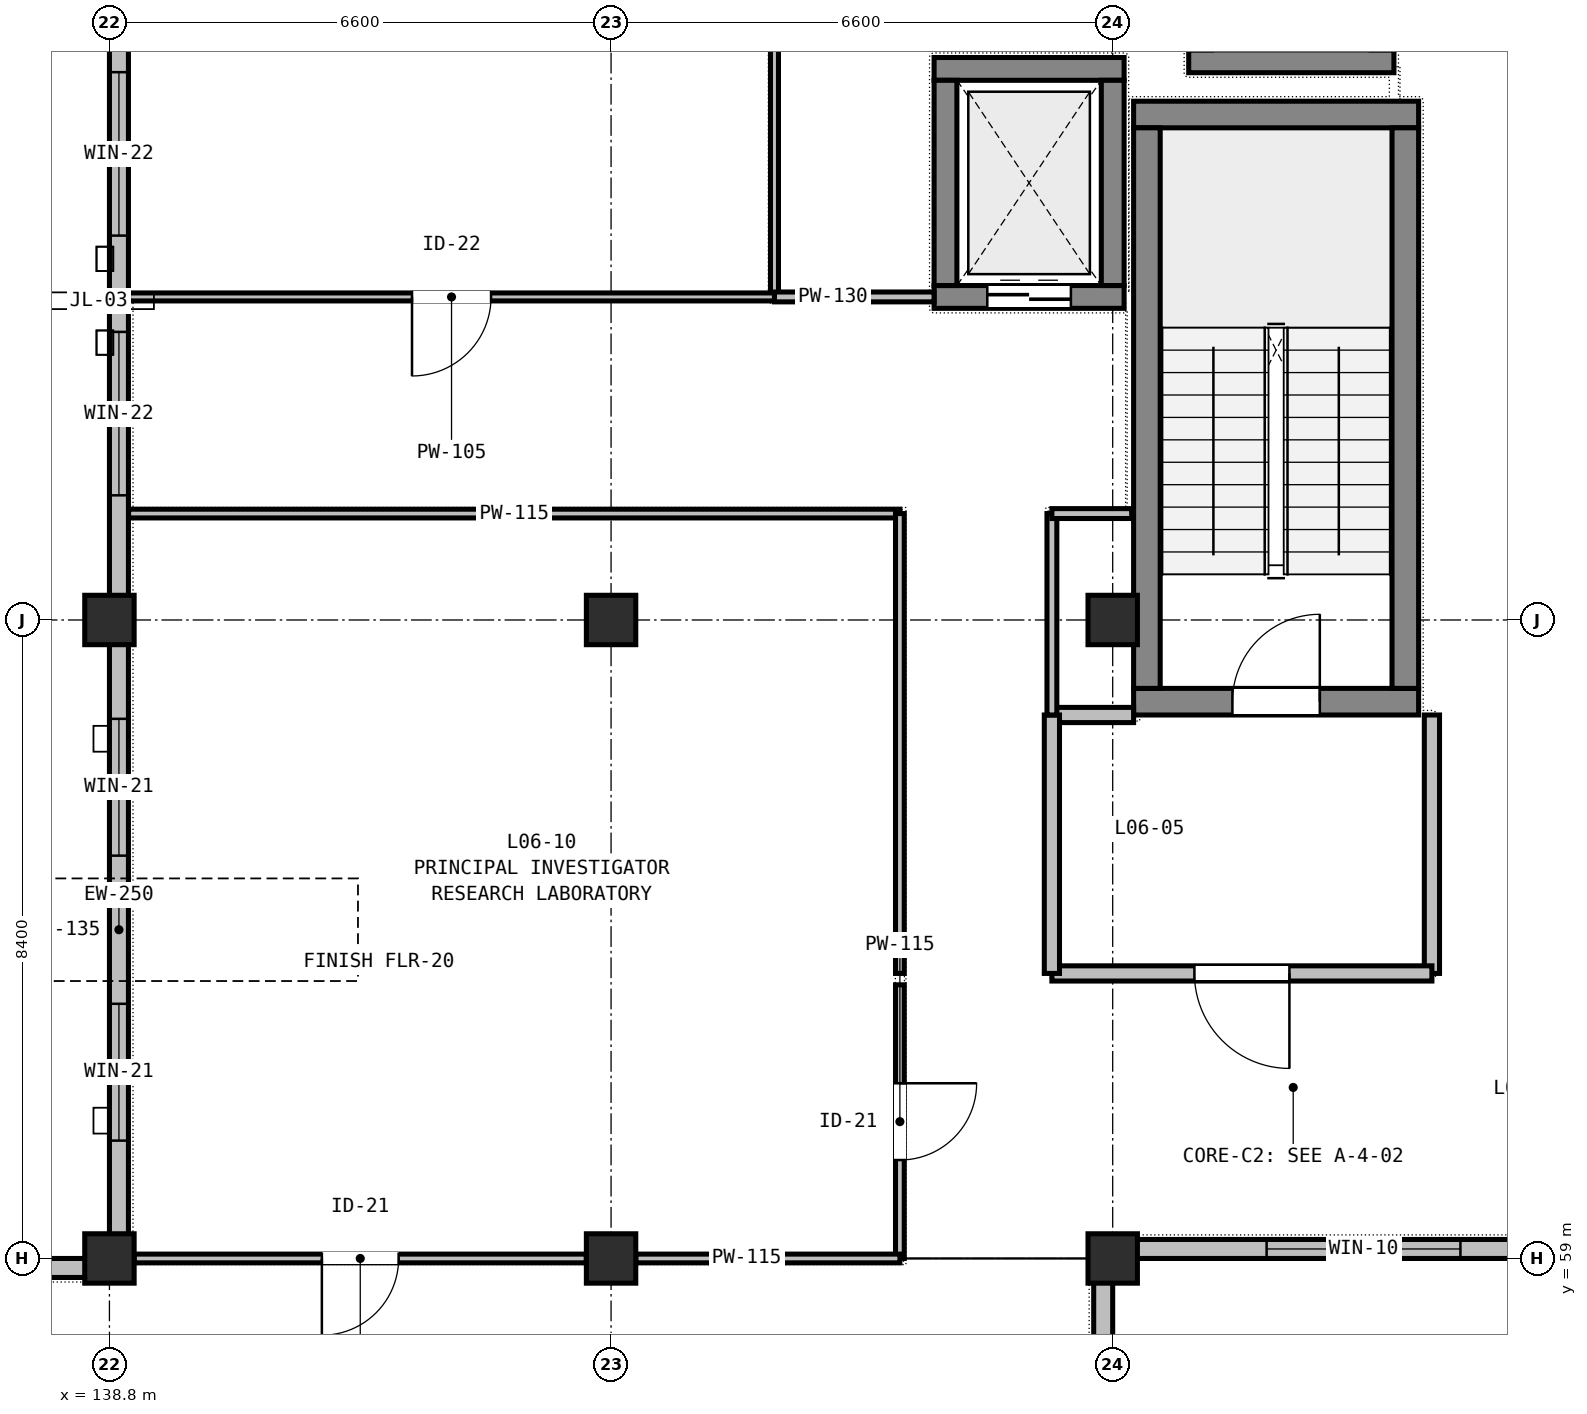
"""IFC4 building model, lengths in metres.
Left out: names, types, materials, properties, quantities, classifications, styles, units other than length and angle.
Written with IfcOpenShell. Run it as: python <this file> out.ifc"""

import sys

from ifc_helpers import new_model, si_unit, direction, frame, frame_2d, origin, origin_2d, place, context, subcontext, project, spatial, rectangle, extrude, element, fill, save


model = new_model("IFC4")
c1 = context("Model", 3, precision=1e-05, world=origin(), true_north=direction((0.0, 1.0)))
c2 = subcontext(c1, "Body", "Model", "MODEL_VIEW")
j1 = project(units=[si_unit("LENGTHUNIT", "METRE"), si_unit("PLANEANGLEUNIT", "RADIAN")], contexts=[c1])
p1 = place(None, origin())
s1 = spatial("IfcSite", under=j1, at=p1, CompositionType="ELEMENT")
p2 = place(p1, origin())
s2 = spatial("IfcBuilding", under=s1, at=p2, CompositionType="ELEMENT")
p3 = place(p2, frame((0.0, 0.0, 28.5)))
s3 = spatial("IfcBuildingStorey", under=s2, at=p3, CompositionType="ELEMENT", Elevation=28.5)
for number, where, z_axis, x_axis in (
    (1, (138.8, 59.0, 0.0), (0.0, 0.0, 1.0), (1.0, 0.0, 0.0)),
    (2, (138.8, 67.4, 0.0), (0.0, 0.0, 1.0), (1.0, 0.0, 0.0)),
):
    element("IfcColumn", number, at=place(p3, frame(where, z_axis=z_axis, x_axis=x_axis)), inside=s3, PredefinedType="COLUMN", context=c2, shape_type="SweptSolid", body=[
        extrude(rectangle(XDim=0.65, YDim=0.65, at=origin_2d()), origin(), (0.0, 0.0, 1.0), 4.14),
    ])
for number, where, z_axis, x_axis in (
    (3, (145.4, 59.0, 0.0), (0.0, 0.0, 1.0), (1.0, 0.0, 0.0)),
    (4, (145.4, 67.4, 0.0), (0.0, 0.0, 1.0), (1.0, 0.0, 0.0)),
    (5, (152.0, 59.0, 0.0), (0.0, 0.0, 1.0), (1.0, 0.0, 0.0)),
    (6, (152.0, 67.4, 0.0), (0.0, 0.0, 1.0), (1.0, 0.0, 0.0)),
):
    element("IfcColumn", number, at=place(p3, frame(where, z_axis=z_axis, x_axis=x_axis)), inside=s3, PredefinedType="COLUMN", context=c2, shape_type="SweptSolid", body=[
        extrude(rectangle(XDim=0.65, YDim=0.65, at=origin_2d()), origin(), (0.0, 0.0, 1.0), 4.2),
    ])
p4 = place(p3, frame((152.275, 66.325, 0.0), z_axis=(0.0, 0.0, 1.0), x_axis=(1.0, 0.0, 0.0)))
e7 = element("IfcWall", 7, at=p4, inside=s3, PredefinedType="SHEAR", context=c2, shape_type="SweptSolid", body=[
    extrude(rectangle(XDim=3.75, YDim=0.35, at=frame_2d((1.875, 0.0))), origin(), (0.0, 0.0, 1.0), 4.2),
])
p5 = place(p4, frame((1.3, 0.0, 0.0)))
e8 = element("IfcOpeningElement", 8, at=p5, cuts=e7, PredefinedType="OPENING", context=c2, shape_type="SweptSolid", body=[
    extrude(rectangle(XDim=1.15, YDim=2.15, at=frame_2d((0.575, 1.075))), frame((0.0, 0.185, 0.0), z_axis=(0.0, -1.0, 0.0), x_axis=(1.0, 0.0, 0.0)), (0.0, 0.0, 1.0), 0.37),
])
p6 = place(p3, frame((152.275, 74.05, 0.0), z_axis=(0.0, 0.0, 1.0), x_axis=(1.0, 0.0, 0.0)))
e9 = element("IfcWall", 9, at=p6, inside=s3, PredefinedType="SHEAR", context=c2, shape_type="SweptSolid", body=[
    extrude(rectangle(XDim=3.75, YDim=0.35, at=frame_2d((1.875, 0.0))), origin(), (0.0, 0.0, 1.0), 4.2),
])
for number, where, z_axis, x_axis in (
    (10, (152.45, 66.5, 0.0), (0.0, 0.0, 1.0), (0.0, 1.0, 0.0)),
    (11, (155.85, 66.5, 0.0), (0.0, 0.0, 1.0), (0.0, 1.0, 0.0)),
):
    element("IfcWall", number, at=place(p3, frame(where, z_axis=z_axis, x_axis=x_axis)), inside=s3, PredefinedType="SHEAR", context=c2, shape_type="SweptSolid", body=[
        extrude(rectangle(XDim=7.375, YDim=0.35, at=frame_2d((3.688, 0.0))), origin(), (0.0, 0.0, 1.0), 4.2),
    ])
p7 = place(p3, frame((149.65, 71.65, 0.0), z_axis=(0.0, 0.0, 1.0), x_axis=(1.0, 0.0, 0.0)))
e12 = element("IfcWall", 12, at=p7, inside=s3, PredefinedType="SHEAR", context=c2, shape_type="SweptSolid", body=[
    extrude(rectangle(XDim=2.5, YDim=0.3, at=frame_2d((1.25, 0.0))), origin(), (0.0, 0.0, 1.0), 4.2),
])
p8 = place(p7, frame((0.7, 0.0, 0.0)))
e13 = element("IfcOpeningElement", 13, at=p8, cuts=e12, PredefinedType="OPENING", context=c2, shape_type="SweptSolid", body=[
    extrude(rectangle(XDim=1.1, YDim=2.1, at=frame_2d((0.55, 1.05))), frame((0.0, 0.16, 0.0), z_axis=(0.0, -1.0, 0.0), x_axis=(1.0, 0.0, 0.0)), (0.0, 0.0, 1.0), 0.32),
])
p9 = place(p3, frame((149.65, 74.65, 0.0), z_axis=(0.0, 0.0, 1.0), x_axis=(1.0, 0.0, 0.0)))
e14 = element("IfcWall", 14, at=p9, inside=s3, PredefinedType="SHEAR", context=c2, shape_type="SweptSolid", body=[
    extrude(rectangle(XDim=2.5, YDim=0.3, at=frame_2d((1.25, 0.0))), origin(), (0.0, 0.0, 1.0), 4.2),
])
for number, where, z_axis, x_axis in (
    (15, (149.8, 71.8, 0.0), (0.0, 0.0, 1.0), (0.0, 1.0, 0.0)),
    (16, (152.0, 71.8, 0.0), (0.0, 0.0, 1.0), (0.0, 1.0, 0.0)),
    (17, (153.0, 74.75, 0.0), (0.0, 0.0, 1.0), (1.0, 0.0, 0.0)),
):
    element("IfcWall", number, at=place(p3, frame(where, z_axis=z_axis, x_axis=x_axis)), inside=s3, PredefinedType="SHEAR", context=c2, shape_type="SweptSolid", body=[
        extrude(rectangle(XDim=2.7, YDim=0.3, at=frame_2d((1.35, 0.0))), origin(), (0.0, 0.0, 1.0), 4.2),
    ])
p10 = place(p3, frame((135.2, 58.875, 0.0), z_axis=(0.0, 0.0, 1.0), x_axis=(1.0, 0.0, 0.0)))
e18 = element("IfcWall", 18, at=p10, inside=s3, PredefinedType="STANDARD", context=c2, shape_type="SweptSolid", body=[
    extrude(rectangle(XDim=3.6, YDim=0.25, at=frame_2d((1.8, 0.0))), origin(), (0.0, 0.0, 1.0), 3.435),
])
p11 = place(p10, frame((1.025, 0.0, 0.75)))
e19 = element("IfcOpeningElement", 19, at=p11, cuts=e18, PredefinedType="OPENING", context=c2, shape_type="SweptSolid", body=[
    extrude(rectangle(XDim=1.55, YDim=2.4, at=frame_2d((0.775, 1.2))), frame((0.0, 0.135, 0.0), z_axis=(0.0, -1.0, 0.0), x_axis=(1.0, 0.0, 0.0)), (0.0, 0.0, 1.0), 0.27),
])
p12 = place(p3, frame((138.925, 59.25, 0.0), z_axis=(0.0, 0.0, 1.0), x_axis=(0.0, 1.0, 0.0)))
e20 = element("IfcWall", 20, at=p12, inside=s3, PredefinedType="STANDARD", context=c2, shape_type="SweptSolid", body=[
    extrude(rectangle(XDim=8.15, YDim=0.25, at=frame_2d((4.075, 0.0))), origin(), (0.0, 0.0, 1.0), 3.585),
])
p13 = place(p12, frame((1.301, 0.0, 0.75)))
e21 = element("IfcOpeningElement", 21, at=p13, cuts=e20, PredefinedType="OPENING", context=c2, shape_type="SweptSolid", body=[
    extrude(rectangle(XDim=1.8, YDim=2.4, at=frame_2d((0.9, 1.2))), frame((0.0, 0.135, 0.0), z_axis=(0.0, -1.0, 0.0), x_axis=(1.0, 0.0, 0.0)), (0.0, 0.0, 1.0), 0.27),
])
p14 = place(p12, frame((5.05, 0.0, 0.75)))
e22 = element("IfcOpeningElement", 22, at=p14, cuts=e20, PredefinedType="OPENING", context=c2, shape_type="SweptSolid", body=[
    extrude(rectangle(XDim=1.8, YDim=2.4, at=frame_2d((0.9, 1.2))), frame((0.0, 0.135, 0.0), z_axis=(0.0, -1.0, 0.0), x_axis=(1.0, 0.0, 0.0)), (0.0, 0.0, 1.0), 0.27),
])
p15 = place(p3, frame((138.925, 67.4, 0.0), z_axis=(0.0, 0.0, 1.0), x_axis=(0.0, 1.0, 0.0)))
e23 = element("IfcWall", 23, at=p15, inside=s3, PredefinedType="STANDARD", context=c2, shape_type="SweptSolid", body=[
    extrude(rectangle(XDim=8.4, YDim=0.25, at=frame_2d((4.2, 0.0))), origin(), (0.0, 0.0, 1.0), 3.585),
])
p16 = place(p15, frame((1.64, 0.0, 0.75)))
e24 = element("IfcOpeningElement", 24, at=p16, cuts=e23, PredefinedType="OPENING", context=c2, shape_type="SweptSolid", body=[
    extrude(rectangle(XDim=2.15, YDim=2.4, at=frame_2d((1.075, 1.2))), frame((0.0, 0.135, 0.0), z_axis=(0.0, -1.0, 0.0), x_axis=(1.0, 0.0, 0.0)), (0.0, 0.0, 1.0), 0.27),
])
p17 = place(p15, frame((5.057, 0.0, 0.75)))
e25 = element("IfcOpeningElement", 25, at=p17, cuts=e23, PredefinedType="OPENING", context=c2, shape_type="SweptSolid", body=[
    extrude(rectangle(XDim=2.15, YDim=2.4, at=frame_2d((1.075, 1.2))), frame((0.0, 0.135, 0.0), z_axis=(0.0, -1.0, 0.0), x_axis=(1.0, 0.0, 0.0)), (0.0, 0.0, 1.0), 0.27),
])
p18 = place(p3, frame((158.6, 59.125, 0.0), z_axis=(0.0, 0.0, 1.0), x_axis=(-1.0, 0.0, 0.0)))
e26 = element("IfcWall", 26, at=p18, inside=s3, PredefinedType="STANDARD", context=c2, shape_type="SweptSolid", body=[
    extrude(rectangle(XDim=6.6, YDim=0.25, at=frame_2d((3.3, 0.0))), origin(), (0.0, 0.0, 1.0), 3.435),
])
p19 = place(p18, frame((2.025, 0.0, 0.75)))
e27 = element("IfcOpeningElement", 27, at=p19, cuts=e26, PredefinedType="OPENING", context=c2, shape_type="SweptSolid", body=[
    extrude(rectangle(XDim=2.55, YDim=2.15, at=frame_2d((1.275, 1.075))), frame((0.0, 0.135, 0.0), z_axis=(0.0, -1.0, 0.0), x_axis=(1.0, 0.0, 0.0)), (0.0, 0.0, 1.0), 0.27),
])
p20 = place(p3, frame((151.875, 58.75, 0.0), z_axis=(0.0, 0.0, 1.0), x_axis=(0.0, -1.0, 0.0)))
e28 = element("IfcWall", 28, at=p20, inside=s3, PredefinedType="STANDARD", context=c2, shape_type="SweptSolid", body=[
    extrude(rectangle(XDim=8.15, YDim=0.25, at=frame_2d((4.075, 0.0))), origin(), (0.0, 0.0, 1.0), 3.585),
])
p21 = place(p20, frame((3.19, 0.0, 0.75)))
e29 = element("IfcOpeningElement", 29, at=p21, cuts=e28, PredefinedType="OPENING", context=c2, shape_type="SweptSolid", body=[
    extrude(rectangle(XDim=2.7, YDim=2.2, at=frame_2d((1.35, 1.1))), frame((0.0, 0.135, 0.0), z_axis=(0.0, -1.0, 0.0), x_axis=(1.0, 0.0, 0.0)), (0.0, 0.0, 1.0), 0.27),
])
p22 = place(p3, frame((151.2, 66.15, 0.0), z_axis=(0.0, 0.0, 1.0), x_axis=(1.0, 0.0, 0.0)))
e30 = element("IfcWall", 30, at=p22, inside=s3, PredefinedType="PARTITIONING", context=c2, shape_type="SweptSolid", body=[
    extrude(rectangle(XDim=1.075, YDim=0.2, at=frame_2d((0.538, 0.0))), origin(), (0.0, 0.0, 1.0), 3.435),
])
p23 = place(p3, frame((156.2, 66.15, 0.0), z_axis=(0.0, 0.0, 1.0), x_axis=(0.0, -1.0, 0.0)))
e31 = element("IfcWall", 31, at=p23, inside=s3, PredefinedType="PARTITIONING", context=c2, shape_type="SweptSolid", body=[
    extrude(rectangle(XDim=3.4, YDim=0.2, at=frame_2d((1.7, 0.0))), origin(), (0.0, 0.0, 1.0), 3.915),
])
p24 = place(p3, frame((156.2, 62.75, 0.0), z_axis=(0.0, 0.0, 1.0), x_axis=(-1.0, 0.0, 0.0)))
e32 = element("IfcWall", 32, at=p24, inside=s3, PredefinedType="PARTITIONING", context=c2, shape_type="SweptSolid", body=[
    extrude(rectangle(XDim=5.0, YDim=0.2, at=frame_2d((2.5, 0.0))), origin(), (0.0, 0.0, 1.0), 3.435),
])
p25 = place(p24, frame((1.875, 0.0, 0.0)))
e33 = element("IfcOpeningElement", 33, at=p25, cuts=e32, PredefinedType="OPENING", context=c2, shape_type="SweptSolid", body=[
    extrude(rectangle(XDim=1.25, YDim=2.15, at=frame_2d((0.625, 1.075))), frame((0.0, 0.11, 0.0), z_axis=(0.0, -1.0, 0.0), x_axis=(1.0, 0.0, 0.0)), (0.0, 0.0, 1.0), 0.22),
])
p26 = place(p3, frame((151.2, 62.75, 0.0), z_axis=(0.0, 0.0, 1.0), x_axis=(0.0, 1.0, 0.0)))
e34 = element("IfcWall", 34, at=p26, inside=s3, PredefinedType="PARTITIONING", context=c2, shape_type="SweptSolid", body=[
    extrude(rectangle(XDim=3.4, YDim=0.2, at=frame_2d((1.7, 0.0))), origin(), (0.0, 0.0, 1.0), 3.915),
])
p27 = place(p3, frame((149.2, 62.6, 0.0), z_axis=(0.0, 0.0, 1.0), x_axis=(0.0, -1.0, 0.0)))
e35 = element("IfcWall", 35, at=p27, inside=s3, PredefinedType="PARTITIONING", context=c2, shape_type="SweptSolid", body=[
    extrude(rectangle(XDim=3.6, YDim=0.115, at=frame_2d((1.8, 0.0))), origin(), (0.0, 0.0, 1.0), 3.585),
])
p28 = place(p27, frame((1.295, 0.0, 0.0)))
e36 = element("IfcOpeningElement", 36, at=p28, cuts=e35, PredefinedType="OPENING", context=c2, shape_type="SweptSolid", body=[
    extrude(rectangle(XDim=1.01, YDim=2.14, at=frame_2d((0.505, 1.07))), frame((0.0, 0.067, 0.0), z_axis=(0.0, -1.0, 0.0), x_axis=(1.0, 0.0, 0.0)), (0.0, 0.0, 1.0), 0.135),
])
p29 = place(p3, frame((149.2, 59.0, 0.0), z_axis=(0.0, 0.0, 1.0), x_axis=(-1.0, 0.0, 0.0)))
e37 = element("IfcWall", 37, at=p29, inside=s3, PredefinedType="PARTITIONING", context=c2, shape_type="SweptSolid", body=[
    extrude(rectangle(XDim=3.475, YDim=0.115, at=frame_2d((1.737, 0.0))), origin(), (0.0, 0.0, 1.0), 3.585),
])
p30 = place(p3, frame((145.075, 59.0, 0.0), z_axis=(0.0, 0.0, 1.0), x_axis=(-1.0, 0.0, 0.0)))
e38 = element("IfcWall", 38, at=p30, inside=s3, PredefinedType="PARTITIONING", context=c2, shape_type="SweptSolid", body=[
    extrude(rectangle(XDim=5.95, YDim=0.115, at=frame_2d((2.975, 0.0))), origin(), (0.0, 0.0, 1.0), 3.585),
])
p31 = place(p30, frame((2.47, 0.0, 0.0)))
e39 = element("IfcOpeningElement", 39, at=p31, cuts=e38, PredefinedType="OPENING", context=c2, shape_type="SweptSolid", body=[
    extrude(rectangle(XDim=1.01, YDim=2.14, at=frame_2d((0.505, 1.07))), frame((0.0, 0.067, 0.0), z_axis=(0.0, -1.0, 0.0), x_axis=(1.0, 0.0, 0.0)), (0.0, 0.0, 1.0), 0.135),
])
p32 = place(p3, frame((139.052, 68.8, 0.0), z_axis=(0.0, 0.0, 1.0), x_axis=(1.0, 0.0, 0.0)))
e40 = element("IfcWall", 40, at=p32, inside=s3, PredefinedType="PARTITIONING", context=c2, shape_type="SweptSolid", body=[
    extrude(rectangle(XDim=10.148, YDim=0.115, at=frame_2d((5.074, 0.0))), origin(), (0.0, 0.0, 1.0), 3.435),
])
p33 = place(p3, frame((149.2, 68.8, 0.0), z_axis=(0.0, 0.0, 1.0), x_axis=(0.0, -1.0, 0.0)))
e41 = element("IfcWall", 41, at=p33, inside=s3, PredefinedType="PARTITIONING", context=c2, shape_type="SweptSolid", body=[
    extrude(rectangle(XDim=6.05, YDim=0.115, at=frame_2d((3.025, 0.0))), origin(), (0.0, 0.0, 1.0), 3.585),
])
p34 = place(p3, frame((147.55, 83.948, 0.0), z_axis=(0.0, 0.0, 1.0), x_axis=(0.0, -1.0, 0.0)))
e42 = element("IfcWall", 42, at=p34, inside=s3, PredefinedType="PARTITIONING", context=c2, shape_type="SweptSolid", body=[
    extrude(rectangle(XDim=12.298, YDim=0.105, at=frame_2d((6.149, 0.0))), origin(), (0.0, 0.0, 1.0), 3.585),
])
p35 = place(p34, frame((2.923, 0.0, 0.0)))
e43 = element("IfcOpeningElement", 43, at=p35, cuts=e42, PredefinedType="OPENING", context=c2, shape_type="SweptSolid", body=[
    extrude(rectangle(XDim=1.04, YDim=2.14, at=frame_2d((0.52, 1.07))), frame((0.0, 0.062, 0.0), z_axis=(0.0, -1.0, 0.0), x_axis=(1.0, 0.0, 0.0)), (0.0, 0.0, 1.0), 0.125),
])
p36 = place(p3, frame((147.55, 71.65, 0.0), z_axis=(0.0, 0.0, 1.0), x_axis=(-1.0, 0.0, 0.0)))
e44 = element("IfcWall", 44, at=p36, inside=s3, PredefinedType="PARTITIONING", context=c2, shape_type="SweptSolid", body=[
    extrude(rectangle(XDim=8.498, YDim=0.105, at=frame_2d((4.249, 0.0))), origin(), (0.0, 0.0, 1.0), 3.435),
])
p37 = place(p36, frame((3.729, 0.0, 0.0)))
e45 = element("IfcOpeningElement", 45, at=p37, cuts=e44, PredefinedType="OPENING", context=c2, shape_type="SweptSolid", body=[
    extrude(rectangle(XDim=1.04, YDim=2.14, at=frame_2d((0.52, 1.07))), frame((0.0, 0.062, 0.0), z_axis=(0.0, -1.0, 0.0), x_axis=(1.0, 0.0, 0.0)), (0.0, 0.0, 1.0), 0.125),
])
p38 = place(p3, frame((151.2, 66.15, 0.0), z_axis=(0.0, 0.0, 1.0), x_axis=(0.0, 1.0, 0.0)))
e46 = element("IfcWall", 46, at=p38, inside=s3, PredefinedType="PARTITIONING", context=c2, shape_type="SweptSolid", body=[
    extrude(rectangle(XDim=2.65, YDim=0.13, at=frame_2d((1.325, 0.0))), origin(), (0.0, 0.0, 1.0), 3.585),
])
p39 = place(p3, frame((151.2, 68.8, 0.0), z_axis=(0.0, 0.0, 1.0), x_axis=(1.0, 0.0, 0.0)))
e47 = element("IfcWall", 47, at=p39, inside=s3, PredefinedType="PARTITIONING", context=c2, shape_type="SweptSolid", body=[
    extrude(rectangle(XDim=1.05, YDim=0.13, at=frame_2d((0.525, 0.0))), origin(), (0.0, 0.0, 1.0), 3.435),
])
p40 = place(p3, frame((149.65, 71.65, 0.0), z_axis=(0.0, 0.0, 1.0), x_axis=(-1.0, 0.0, 0.0)))
e48 = element("IfcWall", 48, at=p40, inside=s3, PredefinedType="PARTITIONING", context=c2, shape_type="SweptSolid", body=[
    extrude(rectangle(XDim=2.1, YDim=0.13, at=frame_2d((1.05, 0.0))), origin(), (0.0, 0.0, 1.0), 3.735),
])
p41 = place(p13, origin())
e49 = element("IfcWindow", 49, at=p41, inside=s3, PartitioningType="SINGLE_PANEL", PredefinedType="WINDOW", context=c2, shape_type="SweptSolid", body=[
    extrude(rectangle(XDim=1.8, YDim=2.4, at=frame_2d((0.9, 1.2))), frame((0.0, 0.03, 0.0), z_axis=(0.0, -1.0, 0.0), x_axis=(1.0, 0.0, 0.0)), (0.0, 0.0, 1.0), 0.06),
])
fill(e21, e49)
p42 = place(p14, origin())
e50 = element("IfcWindow", 50, at=p42, inside=s3, PartitioningType="SINGLE_PANEL", PredefinedType="WINDOW", context=c2, shape_type="SweptSolid", body=[
    extrude(rectangle(XDim=1.8, YDim=2.4, at=frame_2d((0.9, 1.2))), frame((0.0, 0.03, 0.0), z_axis=(0.0, -1.0, 0.0), x_axis=(1.0, 0.0, 0.0)), (0.0, 0.0, 1.0), 0.06),
])
fill(e22, e50)
p43 = place(p16, origin())
e51 = element("IfcWindow", 51, at=p43, inside=s3, PartitioningType="SINGLE_PANEL", PredefinedType="WINDOW", context=c2, shape_type="SweptSolid", body=[
    extrude(rectangle(XDim=2.15, YDim=2.4, at=frame_2d((1.075, 1.2))), frame((0.0, 0.03, 0.0), z_axis=(0.0, -1.0, 0.0), x_axis=(1.0, 0.0, 0.0)), (0.0, 0.0, 1.0), 0.06),
])
fill(e24, e51)
p44 = place(p17, origin())
e52 = element("IfcWindow", 52, at=p44, inside=s3, PartitioningType="SINGLE_PANEL", PredefinedType="WINDOW", context=c2, shape_type="SweptSolid", body=[
    extrude(rectangle(XDim=2.15, YDim=2.4, at=frame_2d((1.075, 1.2))), frame((0.0, 0.03, 0.0), z_axis=(0.0, -1.0, 0.0), x_axis=(1.0, 0.0, 0.0)), (0.0, 0.0, 1.0), 0.06),
])
fill(e25, e52)
p45 = place(p19, origin())
e53 = element("IfcWindow", 53, at=p45, inside=s3, PartitioningType="SINGLE_PANEL", PredefinedType="WINDOW", context=c2, shape_type="SweptSolid", body=[
    extrude(rectangle(XDim=2.55, YDim=2.15, at=frame_2d((1.275, 1.075))), frame((0.0, 0.03, 0.0), z_axis=(0.0, -1.0, 0.0), x_axis=(1.0, 0.0, 0.0)), (0.0, 0.0, 1.0), 0.06),
])
fill(e27, e53)
p46 = place(p5, origin())
e54 = element("IfcDoor", 54, at=p46, inside=s3, OperationType="SINGLE_SWING_RIGHT", PredefinedType="DOOR", context=c2, shape_type="SweptSolid", body=[
    extrude(rectangle(XDim=1.15, YDim=2.15, at=frame_2d((0.575, 1.075))), frame((0.0, 0.025, 0.0), z_axis=(0.0, -1.0, 0.0), x_axis=(1.0, 0.0, 0.0)), (0.0, 0.0, 1.0), 0.05),
])
fill(e8, e54)
p47 = place(p8, origin())
e55 = element("IfcDoor", 55, at=p47, inside=s3, OperationType="DOUBLE_DOOR_SLIDING", PredefinedType="DOOR", context=c2, shape_type="SweptSolid", body=[
    extrude(rectangle(XDim=1.1, YDim=2.1, at=frame_2d((0.55, 1.05))), frame((0.0, 0.025, 0.0), z_axis=(0.0, -1.0, 0.0), x_axis=(1.0, 0.0, 0.0)), (0.0, 0.0, 1.0), 0.05),
])
fill(e13, e55)
p48 = place(p25, origin())
e56 = element("IfcDoor", 56, at=p48, inside=s3, OperationType="SINGLE_SWING_LEFT", PredefinedType="DOOR", context=c2, shape_type="SweptSolid", body=[
    extrude(rectangle(XDim=1.25, YDim=2.15, at=frame_2d((0.625, 1.075))), frame((0.0, 0.025, 0.0), z_axis=(0.0, -1.0, 0.0), x_axis=(1.0, 0.0, 0.0)), (0.0, 0.0, 1.0), 0.05),
])
fill(e33, e56)
p49 = place(p31, origin())
e57 = element("IfcDoor", 57, at=p49, inside=s3, OperationType="SINGLE_SWING_RIGHT", PredefinedType="DOOR", context=c2, shape_type="SweptSolid", body=[
    extrude(rectangle(XDim=1.01, YDim=2.14, at=frame_2d((0.505, 1.07))), frame((0.0, 0.025, 0.0), z_axis=(0.0, -1.0, 0.0), x_axis=(1.0, 0.0, 0.0)), (0.0, 0.0, 1.0), 0.05),
])
fill(e39, e57)
p50 = place(p28, origin())
e58 = element("IfcDoor", 58, at=p50, inside=s3, OperationType="SINGLE_SWING_LEFT", PredefinedType="DOOR", context=c2, shape_type="SweptSolid", body=[
    extrude(rectangle(XDim=1.01, YDim=2.14, at=frame_2d((0.505, 1.07))), frame((0.0, 0.025, 0.0), z_axis=(0.0, -1.0, 0.0), x_axis=(1.0, 0.0, 0.0)), (0.0, 0.0, 1.0), 0.05),
])
fill(e36, e58)
p51 = place(p37, origin())
e59 = element("IfcDoor", 59, at=p51, inside=s3, OperationType="SINGLE_SWING_RIGHT", PredefinedType="DOOR", context=c2, shape_type="SweptSolid", body=[
    extrude(rectangle(XDim=1.04, YDim=2.14, at=frame_2d((0.52, 1.07))), frame((0.0, 0.025, 0.0), z_axis=(0.0, -1.0, 0.0), x_axis=(1.0, 0.0, 0.0)), (0.0, 0.0, 1.0), 0.05),
])
fill(e45, e59)
save(model, sys.argv[1])
